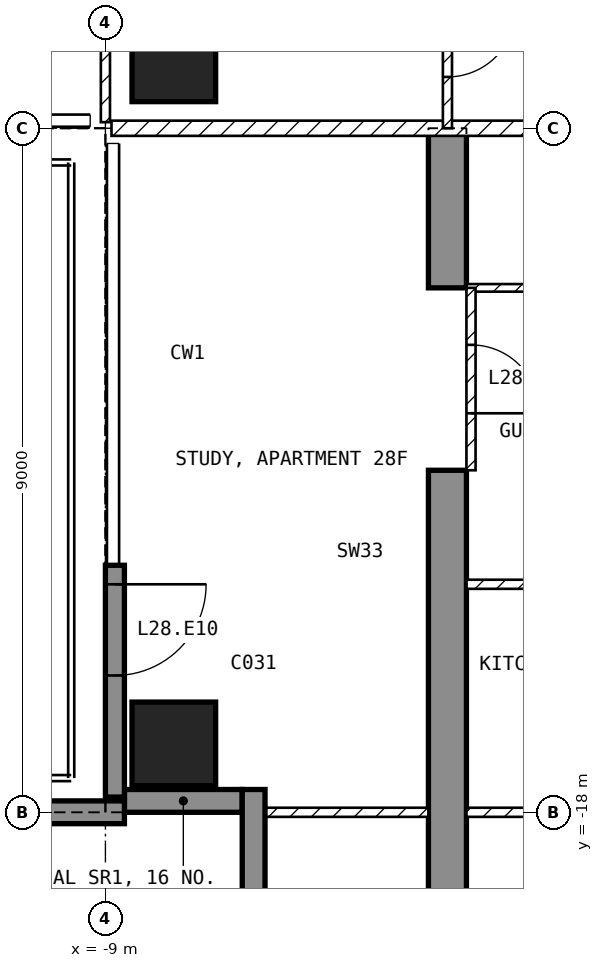
"""IFC4 building model, lengths in metres.
Left out: names, types, materials, properties, quantities, classifications, styles, units other than length and angle.
Written with IfcOpenShell. Run it as: python <this file> out.ifc"""

import sys

from ifc_helpers import new_model, si_unit, direction, frame, frame_2d, origin, origin_2d, place, context, subcontext, project, spatial, polyline, rectangle, outline, extrude, element, fill, save


model = new_model("IFC4")
c1 = context("Model", 3, precision=1e-05, world=origin(), true_north=direction((0.0, 1.0)))
c2 = subcontext(c1, "Body", "Model", "MODEL_VIEW")
j1 = project(units=[si_unit("LENGTHUNIT", "METRE"), si_unit("PLANEANGLEUNIT", "RADIAN")], contexts=[c1])
p1 = place(None, origin())
s1 = spatial("IfcSite", under=j1, at=p1, CompositionType="ELEMENT")
p2 = place(p1, origin())
s2 = spatial("IfcBuilding", under=s1, at=p2, CompositionType="ELEMENT")
p3 = place(p2, frame((0.0, 0.0, 119.9)))
s3 = spatial("IfcBuildingStorey", under=s2, at=p3, CompositionType="ELEMENT", Elevation=119.9)
for number, where, z_axis, x_axis in (
    (1, (-8.1, -17.1, -0.25), (0.0, 0.0, 1.0), (1.0, 0.0, 0.0)),
    (2, (-8.1, -8.1, -0.25), (0.0, 0.0, 1.0), (1.0, 0.0, 0.0)),
):
    element("IfcColumn", number, at=place(p3, frame(where, z_axis=z_axis, x_axis=x_axis)), inside=s3, PredefinedType="COLUMN", context=c2, shape_type="SweptSolid", body=[
        extrude(rectangle(XDim=1.1, YDim=1.1, at=origin_2d()), origin(), (0.0, 0.0, 1.0), 3.5),
    ])
p4 = place(p3, frame((-4.75, -20.15, -0.25), z_axis=(1.0, 0.0, 0.0), x_axis=(0.0, 1.0, 0.0)))
e3 = element("IfcWall", 3, at=p4, inside=s3, PredefinedType="SHEAR", context=c2, shape_type="SweptSolid", body=[
    extrude(outline(polyline([(0.0, 0.0), (6.65, 0.0), (6.65, 2.65), (9.05, 2.65), (9.05, 0.0), (11.15, 0.0), (11.15, 3.5), (0.0, 3.5), (0.0, 0.0)])), origin(), (0.0, 0.0, 1.0), 0.5),
])
p5 = place(p3, frame((-8.875, -14.75, 0.0), z_axis=(0.0, 0.0, 1.0), x_axis=(0.0, -1.0, 0.0)))
e4 = element("IfcWall", 4, at=p5, inside=s3, PredefinedType="SOLIDWALL", context=c2, shape_type="SweptSolid", body=[
    extrude(rectangle(XDim=3.05, YDim=0.25, at=frame_2d((1.525, 0.0))), origin(), (0.0, 0.0, 1.0), 3.25),
])
p6 = place(p5, frame((0.25, 0.0, 0.0)))
e5 = element("IfcOpeningElement", 5, at=p6, cuts=e4, PredefinedType="OPENING", context=c2, shape_type="SweptSolid", body=[
    extrude(rectangle(XDim=1.2, YDim=2.4, at=frame_2d((0.6, 1.2))), frame((0.0, 0.135, 0.0), z_axis=(0.0, -1.0, 0.0), x_axis=(1.0, 0.0, 0.0)), (0.0, 0.0, 1.0), 0.27),
])
p7 = place(p3, frame((-8.75, -17.85, 0.0), z_axis=(0.0, 0.0, 1.0), x_axis=(1.0, 0.0, 0.0)))
e6 = element("IfcWall", 6, at=p7, inside=s3, PredefinedType="SOLIDWALL", context=c2, shape_type="SweptSolid", body=[
    extrude(rectangle(XDim=1.55, YDim=0.3, at=frame_2d((0.775, 0.0))), origin(), (0.0, 0.0, 1.0), 3.25),
])
p8 = place(p3, frame((-7.05, -17.7, 0.0), z_axis=(0.0, 0.0, 1.0), x_axis=(0.0, -1.0, 0.0)))
e7 = element("IfcWall", 7, at=p8, inside=s3, PredefinedType="SOLIDWALL", context=c2, shape_type="SweptSolid", body=[
    extrude(rectangle(XDim=1.8, YDim=0.3, at=frame_2d((0.9, 0.0))), origin(), (0.0, 0.0, 1.0), 3.25),
])
p9 = place(p3, frame((-8.75, -18.0, 0.0), z_axis=(0.0, 0.0, 1.0), x_axis=(-1.0, 0.0, 0.0)))
e8 = element("IfcWall", 8, at=p9, inside=s3, PredefinedType="SOLIDWALL", context=c2, shape_type="SweptSolid", body=[
    extrude(rectangle(XDim=2.99, YDim=0.3, at=frame_2d((1.495, 0.0))), origin(), (0.0, 0.0, 1.0), 3.25),
])
p10 = place(p3, frame((8.92, -9.0, 0.0), z_axis=(0.0, 0.0, 1.0), x_axis=(-1.0, 0.0, 0.0)))
e9 = element("IfcWall", 9, at=p10, inside=s3, PredefinedType="PARTITIONING", context=c2, shape_type="SweptSolid", body=[
    extrude(rectangle(XDim=17.84, YDim=0.2, at=frame_2d((8.92, 0.0))), origin(), (0.0, 0.0, 1.0), 3.25),
])
p11 = place(p10, frame((8.42, 0.0, 0.0)))
e10 = element("IfcOpeningElement", 10, at=p11, cuts=e9, PredefinedType="OPENING", context=c2, shape_type="SweptSolid", body=[
    extrude(rectangle(XDim=1.0, YDim=2.1, at=frame_2d((0.5, 1.05))), frame((0.0, 0.11, 0.0), z_axis=(0.0, -1.0, 0.0), x_axis=(1.0, 0.0, 0.0)), (0.0, 0.0, 1.0), 0.22),
])
p12 = place(p3, frame((-9.0, -1.3, 0.0), z_axis=(0.0, 0.0, 1.0), x_axis=(0.0, -1.0, 0.0)))
e11 = element("IfcWall", 11, at=p12, inside=s3, PredefinedType="PARTITIONING", context=c2, shape_type="SweptSolid", body=[
    extrude(rectangle(XDim=7.62, YDim=0.12, at=frame_2d((3.81, 0.0))), origin(), (0.0, 0.0, 1.0), 3.25),
])
p13 = place(p12, frame((4.77, 0.0, 0.0)))
e12 = element("IfcOpeningElement", 12, at=p13, cuts=e11, PredefinedType="OPENING", context=c2, shape_type="SweptSolid", body=[
    extrude(rectangle(XDim=0.9, YDim=2.1, at=frame_2d((0.45, 1.05))), frame((0.0, 0.07, 0.0), z_axis=(0.0, -1.0, 0.0), x_axis=(1.0, 0.0, 0.0)), (0.0, 0.0, 1.0), 0.14),
])
p14 = place(p3, frame((-4.5, -6.75, 0.0), z_axis=(0.0, 0.0, 1.0), x_axis=(0.0, -1.0, 0.0)))
e13 = element("IfcWall", 13, at=p14, inside=s3, PredefinedType="PARTITIONING", context=c2, shape_type="SweptSolid", body=[
    extrude(rectangle(XDim=2.25, YDim=0.12, at=frame_2d((1.125, 0.0))), origin(), (0.0, 0.0, 1.0), 3.25),
])
p15 = place(p14, frame((0.675, 0.0, 0.0)))
e14 = element("IfcOpeningElement", 14, at=p15, cuts=e13, PredefinedType="OPENING", context=c2, shape_type="SweptSolid", body=[
    extrude(rectangle(XDim=0.9, YDim=2.1, at=frame_2d((0.45, 1.05))), frame((0.0, 0.07, 0.0), z_axis=(0.0, -1.0, 0.0), x_axis=(1.0, 0.0, 0.0)), (0.0, 0.0, 1.0), 0.14),
])
p16 = place(p3, frame((-2.1, -11.1, 0.0), z_axis=(0.0, 0.0, 1.0), x_axis=(-1.0, 0.0, 0.0)))
e15 = element("IfcWall", 15, at=p16, inside=s3, PredefinedType="PARTITIONING", context=c2, shape_type="SweptSolid", body=[
    extrude(rectangle(XDim=2.15, YDim=0.1, at=frame_2d((1.075, 0.0))), origin(), (0.0, 0.0, 1.0), 3.25),
])
p17 = place(p3, frame((-0.44, -15.0, 0.0), z_axis=(0.0, 0.0, 1.0), x_axis=(-1.0, 0.0, 0.0)))
e16 = element("IfcWall", 16, at=p17, inside=s3, PredefinedType="PARTITIONING", context=c2, shape_type="SweptSolid", body=[
    extrude(rectangle(XDim=3.81, YDim=0.12, at=frame_2d((1.905, 0.0))), origin(), (0.0, 0.0, 1.0), 3.25),
])
p18 = place(p3, frame((4.25, -18.0, 0.0), z_axis=(0.0, 0.0, 1.0), x_axis=(-1.0, 0.0, 0.0)))
e17 = element("IfcWall", 17, at=p18, inside=s3, PredefinedType="PARTITIONING", context=c2, shape_type="SweptSolid", body=[
    extrude(rectangle(XDim=8.5, YDim=0.12, at=frame_2d((4.25, 0.0))), origin(), (0.0, 0.0, 1.0), 3.25),
])
p19 = place(p18, frame((1.925, 0.0, 0.0)))
e18 = element("IfcOpeningElement", 18, at=p19, cuts=e17, PredefinedType="OPENING", context=c2, shape_type="SweptSolid", body=[
    extrude(rectangle(XDim=0.9, YDim=2.1, at=frame_2d((0.45, 1.05))), frame((0.0, 0.07, 0.0), z_axis=(0.0, -1.0, 0.0), x_axis=(1.0, 0.0, 0.0)), (0.0, 0.0, 1.0), 0.14),
])
p20 = place(p3, frame((-4.75, -18.0, 0.0), z_axis=(0.0, 0.0, 1.0), x_axis=(-1.0, 0.0, 0.0)))
e19 = element("IfcWall", 19, at=p20, inside=s3, PredefinedType="PARTITIONING", context=c2, shape_type="SweptSolid", body=[
    extrude(rectangle(XDim=2.37, YDim=0.12, at=frame_2d((1.185, 0.0))), origin(), (0.0, 0.0, 1.0), 3.25),
])
p21 = place(p3, frame((-4.19, -11.1, 0.0), z_axis=(0.0, 0.0, 1.0), x_axis=(0.0, -1.0, 0.0)))
e20 = element("IfcWall", 20, at=p21, inside=s3, PredefinedType="PARTITIONING", context=c2, shape_type="SweptSolid", body=[
    extrude(rectangle(XDim=2.4, YDim=0.12, at=frame_2d((1.2, 0.0))), origin(), (0.0, 0.0, 1.0), 2.4),
])
p22 = place(p21, frame((0.75, 0.0, 0.0)))
e21 = element("IfcOpeningElement", 21, at=p22, cuts=e20, PredefinedType="OPENING", context=c2, shape_type="SweptSolid", body=[
    extrude(rectangle(XDim=0.9, YDim=2.1, at=frame_2d((0.45, 1.05))), frame((0.0, 0.07, 0.0), z_axis=(0.0, -1.0, 0.0), x_axis=(1.0, 0.0, 0.0)), (0.0, 0.0, 1.0), 0.14),
])
p23 = place(p6, origin())
e22 = element("IfcDoor", 22, at=p23, inside=s3, OperationType="SINGLE_SWING_LEFT", PredefinedType="DOOR", context=c2, shape_type="SweptSolid", body=[
    extrude(rectangle(XDim=1.2, YDim=2.4, at=frame_2d((0.6, 1.2))), frame((0.0, 0.025, 0.0), z_axis=(0.0, -1.0, 0.0), x_axis=(1.0, 0.0, 0.0)), (0.0, 0.0, 1.0), 0.05),
])
fill(e5, e22)
p24 = place(p15, origin())
e23 = element("IfcDoor", 23, at=p24, inside=s3, OperationType="SINGLE_SWING_LEFT", PredefinedType="DOOR", context=c2, shape_type="SweptSolid", body=[
    extrude(rectangle(XDim=0.9, YDim=2.1, at=frame_2d((0.45, 1.05))), frame((0.0, 0.025, 0.0), z_axis=(0.0, -1.0, 0.0), x_axis=(1.0, 0.0, 0.0)), (0.0, 0.0, 1.0), 0.05),
])
fill(e14, e23)
p25 = place(p22, origin())
e24 = element("IfcDoor", 24, at=p25, inside=s3, OperationType="SINGLE_SWING_RIGHT", PredefinedType="DOOR", context=c2, shape_type="SweptSolid", body=[
    extrude(rectangle(XDim=0.9, YDim=2.1, at=frame_2d((0.45, 1.05))), frame((0.0, 0.025, 0.0), z_axis=(0.0, -1.0, 0.0), x_axis=(1.0, 0.0, 0.0)), (0.0, 0.0, 1.0), 0.05),
])
fill(e21, e24)
save(model, sys.argv[1])
